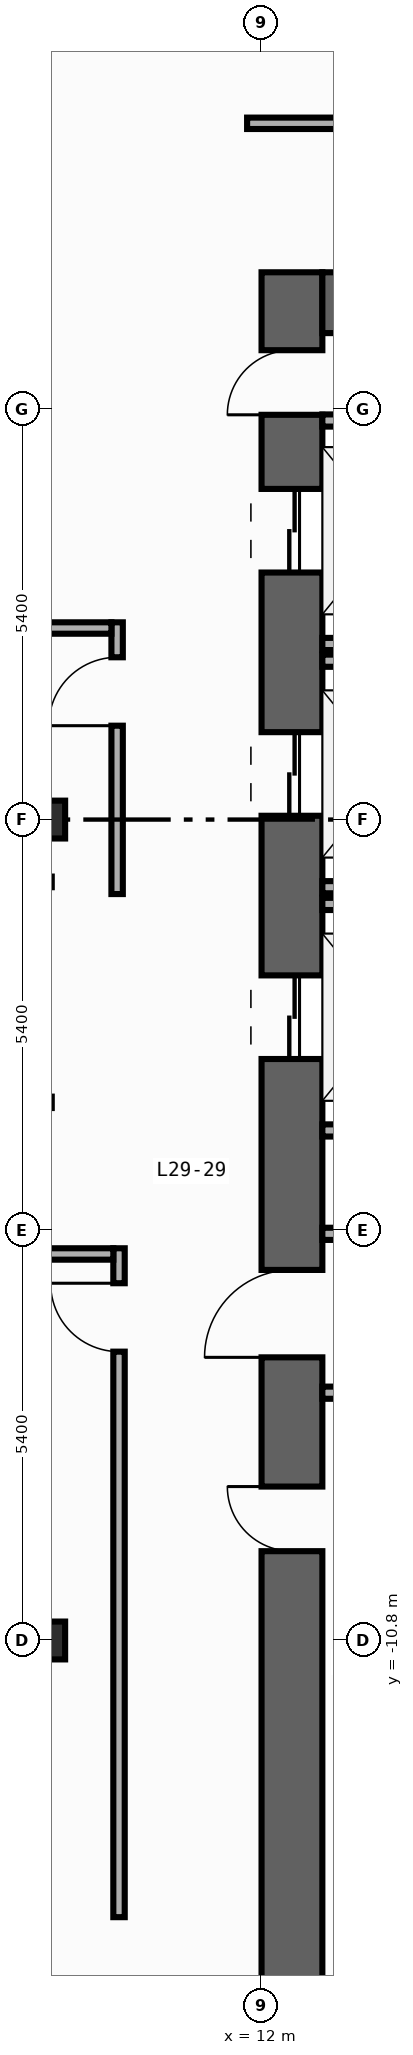
"""IFC4 building model, lengths in metres.
Left out: names, types, materials, properties, quantities, classifications, styles, units other than length and angle.
Written with IfcOpenShell. Run it as: python <this file> out.ifc"""

import sys

from ifc_helpers import new_model, si_unit, direction, frame, frame_2d, origin, origin_2d, place, context, subcontext, project, spatial, rectangle, i_section, extrude, element, fill, save


model = new_model("IFC4")
c1 = context("Model", 3, precision=1e-05, world=origin(), true_north=direction((0.0, 1.0)))
c2 = subcontext(c1, "Body", "Model", "MODEL_VIEW")
j1 = project(units=[si_unit("LENGTHUNIT", "METRE"), si_unit("PLANEANGLEUNIT", "RADIAN")], contexts=[c1])
p1 = place(None, origin())
s1 = spatial("IfcSite", under=j1, at=p1, CompositionType="ELEMENT")
p2 = place(p1, origin())
s2 = spatial("IfcBuilding", under=s1, at=p2, CompositionType="ELEMENT")
p3 = place(p2, frame((0.0, 0.0, 126.8)))
s3 = spatial("IfcBuildingStorey", under=s2, at=p3, CompositionType="ELEMENT", Elevation=126.8)
p4 = place(p3, frame((12.4, -19.8, 0.0), z_axis=(0.0, 0.0, 1.0), x_axis=(0.0, 1.0, 0.0)))
e1 = element("IfcWall", 1, at=p4, inside=s3, PredefinedType="SHEAR", context=c2, shape_type="SweptSolid", body=[
    extrude(rectangle(XDim=27.0, YDim=0.8, at=frame_2d((13.5, 0.0))), origin(), (0.0, 0.0, 1.0), 3.94),
])
p5 = place(p4, frame((23.05, 0.0, 0.0)))
e2 = element("IfcOpeningElement", 2, at=p5, cuts=e1, PredefinedType="OPENING", context=c2, shape_type="SweptSolid", body=[
    extrude(rectangle(XDim=1.1, YDim=2.2, at=frame_2d((0.55, 1.1))), frame((0.0, 0.41, 0.0), z_axis=(0.0, -1.0, 0.0), x_axis=(1.0, 0.0, 0.0)), (0.0, 0.0, 1.0), 0.82),
])
p6 = place(p4, frame((19.85, 0.0, 0.0)))
e3 = element("IfcOpeningElement", 3, at=p6, cuts=e1, PredefinedType="OPENING", context=c2, shape_type="SweptSolid", body=[
    extrude(rectangle(XDim=1.1, YDim=2.2, at=frame_2d((0.55, 1.1))), frame((0.0, 0.41, 0.0), z_axis=(0.0, -1.0, 0.0), x_axis=(1.0, 0.0, 0.0)), (0.0, 0.0, 1.0), 0.82),
])
p7 = place(p4, frame((16.65, 0.0, 0.0)))
e4 = element("IfcOpeningElement", 4, at=p7, cuts=e1, PredefinedType="OPENING", context=c2, shape_type="SweptSolid", body=[
    extrude(rectangle(XDim=1.1, YDim=2.2, at=frame_2d((0.55, 1.1))), frame((0.0, 0.41, 0.0), z_axis=(0.0, -1.0, 0.0), x_axis=(1.0, 0.0, 0.0)), (0.0, 0.0, 1.0), 0.82),
])
p8 = place(p4, frame((10.175, 0.0, 0.0)))
e5 = element("IfcOpeningElement", 5, at=p8, cuts=e1, PredefinedType="OPENING", context=c2, shape_type="SweptSolid", body=[
    extrude(rectangle(XDim=0.85, YDim=2.1, at=frame_2d((0.425, 1.05))), frame((0.0, 0.41, 0.0), z_axis=(0.0, -1.0, 0.0), x_axis=(1.0, 0.0, 0.0)), (0.0, 0.0, 1.0), 0.82),
])
p9 = place(p4, frame((12.725, 0.0, 0.0)))
e6 = element("IfcOpeningElement", 6, at=p9, cuts=e1, PredefinedType="OPENING", context=c2, shape_type="SweptSolid", body=[
    extrude(rectangle(XDim=1.15, YDim=2.2, at=frame_2d((0.575, 1.1))), frame((0.0, 0.41, 0.0), z_axis=(0.0, -1.0, 0.0), x_axis=(1.0, 0.0, 0.0)), (0.0, 0.0, 1.0), 0.82),
])
p10 = place(p4, frame((25.125, 0.0, 0.0)))
e7 = element("IfcOpeningElement", 7, at=p10, cuts=e1, PredefinedType="OPENING", context=c2, shape_type="SweptSolid", body=[
    extrude(rectangle(XDim=0.85, YDim=2.1, at=frame_2d((0.425, 1.05))), frame((0.0, 0.41, 0.0), z_axis=(0.0, -1.0, 0.0), x_axis=(1.0, 0.0, 0.0)), (0.0, 0.0, 1.0), 0.82),
])
p11 = place(p3, frame((12.8, 6.8, 0.0), z_axis=(0.0, 0.0, 1.0), x_axis=(1.0, 0.0, 0.0)))
e8 = element("IfcWall", 8, at=p11, inside=s3, PredefinedType="SHEAR", context=c2, shape_type="SweptSolid", body=[
    extrude(rectangle(XDim=6.8, YDim=0.8, at=frame_2d((3.4, 0.0))), origin(), (0.0, 0.0, 1.0), 3.94),
])
for number, where, z_axis, x_axis in (
    (9, (9.2, -10.8, 0.0), (0.0, 0.0, 1.0), (1.0, 0.0, 0.0)),
    (10, (9.2, 0.0, 0.0), (0.0, 0.0, 1.0), (1.0, 0.0, 0.0)),
):
    element("IfcColumn", number, at=place(p3, frame(where, z_axis=z_axis, x_axis=x_axis)), inside=s3, PredefinedType="COLUMN", context=c2, shape_type="SweptSolid", body=[
        extrude(i_section(OverallWidth=0.432, OverallDepth=0.498, WebThickness=0.045, FlangeThickness=0.07, FilletRadius=0.022, at=origin_2d()), origin(), (0.0, 0.0, 1.0), 4.2),
    ])
for number, where, z_axis, x_axis in (
    (11, (12.8, 2.31, 0.0), (0.0, 0.0, 1.0), (1.0, 0.0, 0.0)),
    (12, (12.8, -0.89, 0.0), (0.0, 0.0, 1.0), (1.0, 0.0, 0.0)),
    (13, (12.8, 2.09, 0.0), (0.0, 0.0, 1.0), (1.0, 0.0, 0.0)),
    (14, (12.8, -4.09, 0.0), (0.0, 0.0, 1.0), (1.0, 0.0, 0.0)),
    (15, (12.8, -1.11, 0.0), (0.0, 0.0, 1.0), (1.0, 0.0, 0.0)),
):
    element("IfcWall", number, at=place(p3, frame(where, z_axis=z_axis, x_axis=x_axis)), inside=s3, PredefinedType="STANDARD", context=c2, shape_type="SweptSolid", body=[
        extrude(rectangle(XDim=2.19, YDim=0.16, at=frame_2d((1.095, 0.0))), origin(), (0.0, 0.0, 1.0), 3.94),
    ])
for number, where, z_axis, x_axis in (
    (16, (12.8, -5.45, 0.0), (0.0, 0.0, 1.0), (1.0, 0.0, 0.0)),
    (17, (12.8, -7.54, 0.0), (0.0, 0.0, 1.0), (1.0, 0.0, 0.0)),
    (18, (12.8, 5.25, 0.0), (0.0, 0.0, 1.0), (1.0, 0.0, 0.0)),
):
    element("IfcWall", number, at=place(p3, frame(where, z_axis=z_axis, x_axis=x_axis)), inside=s3, PredefinedType="STANDARD", context=c2, shape_type="SweptSolid", body=[
        extrude(rectangle(XDim=2.6, YDim=0.16, at=frame_2d((1.3, 0.0))), origin(), (0.0, 0.0, 1.0), 3.94),
    ])
p12 = place(p3, frame((10.1, -0.98, 0.0), z_axis=(0.0, 0.0, 1.0), x_axis=(0.0, 1.0, 0.0)))
e19 = element("IfcWall", 19, at=p12, inside=s3, PredefinedType="PARTITIONING", context=c2, shape_type="SweptSolid", body=[
    extrude(rectangle(XDim=3.575, YDim=0.15, at=frame_2d((1.788, 0.0))), origin(), (0.0, 0.0, 1.0), 3.94),
])
p13 = place(p12, frame((2.215, 0.0, 0.0)))
e20 = element("IfcOpeningElement", 20, at=p13, cuts=e19, PredefinedType="OPENING", context=c2, shape_type="SweptSolid", body=[
    extrude(rectangle(XDim=0.9, YDim=2.15, at=frame_2d((0.45, 1.075))), frame((0.0, 0.085, 0.0), z_axis=(0.0, -1.0, 0.0), x_axis=(1.0, 0.0, 0.0)), (0.0, 0.0, 1.0), 0.17),
])
p14 = place(p3, frame((10.125, -14.44, 0.0), z_axis=(0.0, 0.0, 1.0), x_axis=(0.0, 1.0, 0.0)))
e21 = element("IfcWall", 21, at=p14, inside=s3, PredefinedType="PARTITIONING", context=c2, shape_type="SweptSolid", body=[
    extrude(rectangle(XDim=8.8, YDim=0.15, at=frame_2d((4.4, 0.0))), origin(), (0.0, 0.0, 1.0), 3.94),
])
p15 = place(p14, frame((7.44, 0.0, 0.0)))
e22 = element("IfcOpeningElement", 22, at=p15, cuts=e21, PredefinedType="OPENING", context=c2, shape_type="SweptSolid", body=[
    extrude(rectangle(XDim=0.9, YDim=2.15, at=frame_2d((0.45, 1.075))), frame((0.0, 0.085, 0.0), z_axis=(0.0, -1.0, 0.0), x_axis=(1.0, 0.0, 0.0)), (0.0, 0.0, 1.0), 0.17),
])
p16 = place(p3, frame((6.18, 2.52, 0.0), z_axis=(0.0, 0.0, 1.0), x_axis=(1.0, 0.0, 0.0)))
e23 = element("IfcWall", 23, at=p16, inside=s3, PredefinedType="PARTITIONING", context=c2, shape_type="SweptSolid", body=[
    extrude(rectangle(XDim=3.845, YDim=0.15, at=frame_2d((1.922, 0.0))), origin(), (0.0, 0.0, 1.0), 3.94),
])
p17 = place(p16, frame((0.46, 0.0, 0.0)))
e24 = element("IfcOpeningElement", 24, at=p17, cuts=e23, PredefinedType="OPENING", context=c2, shape_type="SweptSolid", body=[
    extrude(rectangle(XDim=0.9, YDim=2.15, at=frame_2d((0.45, 1.075))), frame((0.0, 0.085, 0.0), z_axis=(0.0, -1.0, 0.0), x_axis=(1.0, 0.0, 0.0)), (0.0, 0.0, 1.0), 0.17),
])
p18 = place(p3, frame((-0.015, -5.715, 0.0), z_axis=(0.0, 0.0, 1.0), x_axis=(1.0, 0.0, 0.0)))
e25 = element("IfcWall", 25, at=p18, inside=s3, PredefinedType="PARTITIONING", context=c2, shape_type="SweptSolid", body=[
    extrude(rectangle(XDim=10.065, YDim=0.15, at=frame_2d((5.032, 0.0))), origin(), (0.0, 0.0, 1.0), 3.94),
])
p19 = place(p18, frame((0.46, 0.0, 0.0)))
e26 = element("IfcOpeningElement", 26, at=p19, cuts=e25, PredefinedType="OPENING", context=c2, shape_type="SweptSolid", body=[
    extrude(rectangle(XDim=0.9, YDim=2.15, at=frame_2d((0.45, 1.075))), frame((0.0, 0.085, 0.0), z_axis=(0.0, -1.0, 0.0), x_axis=(1.0, 0.0, 0.0)), (0.0, 0.0, 1.0), 0.17),
])
p20 = place(p3, frame((11.81, 9.16, 0.0), z_axis=(0.0, 0.0, 1.0), x_axis=(1.0, 0.0, 0.0)))
e27 = element("IfcWall", 27, at=p20, inside=s3, PredefinedType="PARTITIONING", context=c2, shape_type="SweptSolid", body=[
    extrude(rectangle(XDim=8.83, YDim=0.15, at=frame_2d((4.415, 0.0))), origin(), (0.0, 0.0, 1.0), 3.94),
])
p21 = place(p20, frame((5.067, 0.0, 0.0)))
e28 = element("IfcOpeningElement", 28, at=p21, cuts=e27, PredefinedType="OPENING", context=c2, shape_type="SweptSolid", body=[
    extrude(rectangle(XDim=0.9, YDim=2.15, at=frame_2d((0.45, 1.075))), frame((0.0, 0.085, 0.0), z_axis=(0.0, -1.0, 0.0), x_axis=(1.0, 0.0, 0.0)), (0.0, 0.0, 1.0), 0.17),
])
p22 = place(p5, origin())
e29 = element("IfcDoor", 29, at=p22, inside=s3, OperationType="DOUBLE_DOOR_SLIDING", PredefinedType="DOOR", context=c2, shape_type="SweptSolid", body=[
    extrude(rectangle(XDim=1.1, YDim=2.2, at=frame_2d((0.55, 1.1))), frame((0.0, 0.025, 0.0), z_axis=(0.0, -1.0, 0.0), x_axis=(1.0, 0.0, 0.0)), (0.0, 0.0, 1.0), 0.05),
])
fill(e2, e29)
p23 = place(p6, origin())
e30 = element("IfcDoor", 30, at=p23, inside=s3, OperationType="DOUBLE_DOOR_SLIDING", PredefinedType="DOOR", context=c2, shape_type="SweptSolid", body=[
    extrude(rectangle(XDim=1.1, YDim=2.2, at=frame_2d((0.55, 1.1))), frame((0.0, 0.025, 0.0), z_axis=(0.0, -1.0, 0.0), x_axis=(1.0, 0.0, 0.0)), (0.0, 0.0, 1.0), 0.05),
])
fill(e3, e30)
p24 = place(p7, origin())
e31 = element("IfcDoor", 31, at=p24, inside=s3, OperationType="DOUBLE_DOOR_SLIDING", PredefinedType="DOOR", context=c2, shape_type="SweptSolid", body=[
    extrude(rectangle(XDim=1.1, YDim=2.2, at=frame_2d((0.55, 1.1))), frame((0.0, 0.025, 0.0), z_axis=(0.0, -1.0, 0.0), x_axis=(1.0, 0.0, 0.0)), (0.0, 0.0, 1.0), 0.05),
])
fill(e4, e31)
p25 = place(p8, origin())
e32 = element("IfcDoor", 32, at=p25, inside=s3, OperationType="SINGLE_SWING_RIGHT", PredefinedType="DOOR", context=c2, shape_type="SweptSolid", body=[
    extrude(rectangle(XDim=0.85, YDim=2.1, at=frame_2d((0.425, 1.05))), frame((0.0, 0.025, 0.0), z_axis=(0.0, -1.0, 0.0), x_axis=(1.0, 0.0, 0.0)), (0.0, 0.0, 1.0), 0.05),
])
fill(e5, e32)
p26 = place(p9, origin())
e33 = element("IfcDoor", 33, at=p26, inside=s3, OperationType="SINGLE_SWING_LEFT", PredefinedType="DOOR", context=c2, shape_type="SweptSolid", body=[
    extrude(rectangle(XDim=1.15, YDim=2.2, at=frame_2d((0.575, 1.1))), frame((0.0, 0.025, 0.0), z_axis=(0.0, -1.0, 0.0), x_axis=(1.0, 0.0, 0.0)), (0.0, 0.0, 1.0), 0.05),
])
fill(e6, e33)
p27 = place(p10, origin())
e34 = element("IfcDoor", 34, at=p27, inside=s3, OperationType="SINGLE_SWING_LEFT", PredefinedType="DOOR", context=c2, shape_type="SweptSolid", body=[
    extrude(rectangle(XDim=0.85, YDim=2.1, at=frame_2d((0.425, 1.05))), frame((0.0, 0.025, 0.0), z_axis=(0.0, -1.0, 0.0), x_axis=(1.0, 0.0, 0.0)), (0.0, 0.0, 1.0), 0.05),
])
fill(e7, e34)
p28 = place(p13, origin())
e35 = element("IfcDoor", 35, at=p28, inside=s3, OperationType="SINGLE_SWING_LEFT", PredefinedType="DOOR", context=c2, shape_type="SweptSolid", body=[
    extrude(rectangle(XDim=0.9, YDim=2.15, at=frame_2d((0.45, 1.075))), frame((0.0, 0.025, 0.0), z_axis=(0.0, -1.0, 0.0), x_axis=(1.0, 0.0, 0.0)), (0.0, 0.0, 1.0), 0.05),
])
fill(e20, e35)
p29 = place(p15, origin())
e36 = element("IfcDoor", 36, at=p29, inside=s3, OperationType="SINGLE_SWING_RIGHT", PredefinedType="DOOR", context=c2, shape_type="SweptSolid", body=[
    extrude(rectangle(XDim=0.9, YDim=2.15, at=frame_2d((0.45, 1.075))), frame((0.0, 0.025, 0.0), z_axis=(0.0, -1.0, 0.0), x_axis=(1.0, 0.0, 0.0)), (0.0, 0.0, 1.0), 0.05),
])
fill(e22, e36)
save(model, sys.argv[1])
